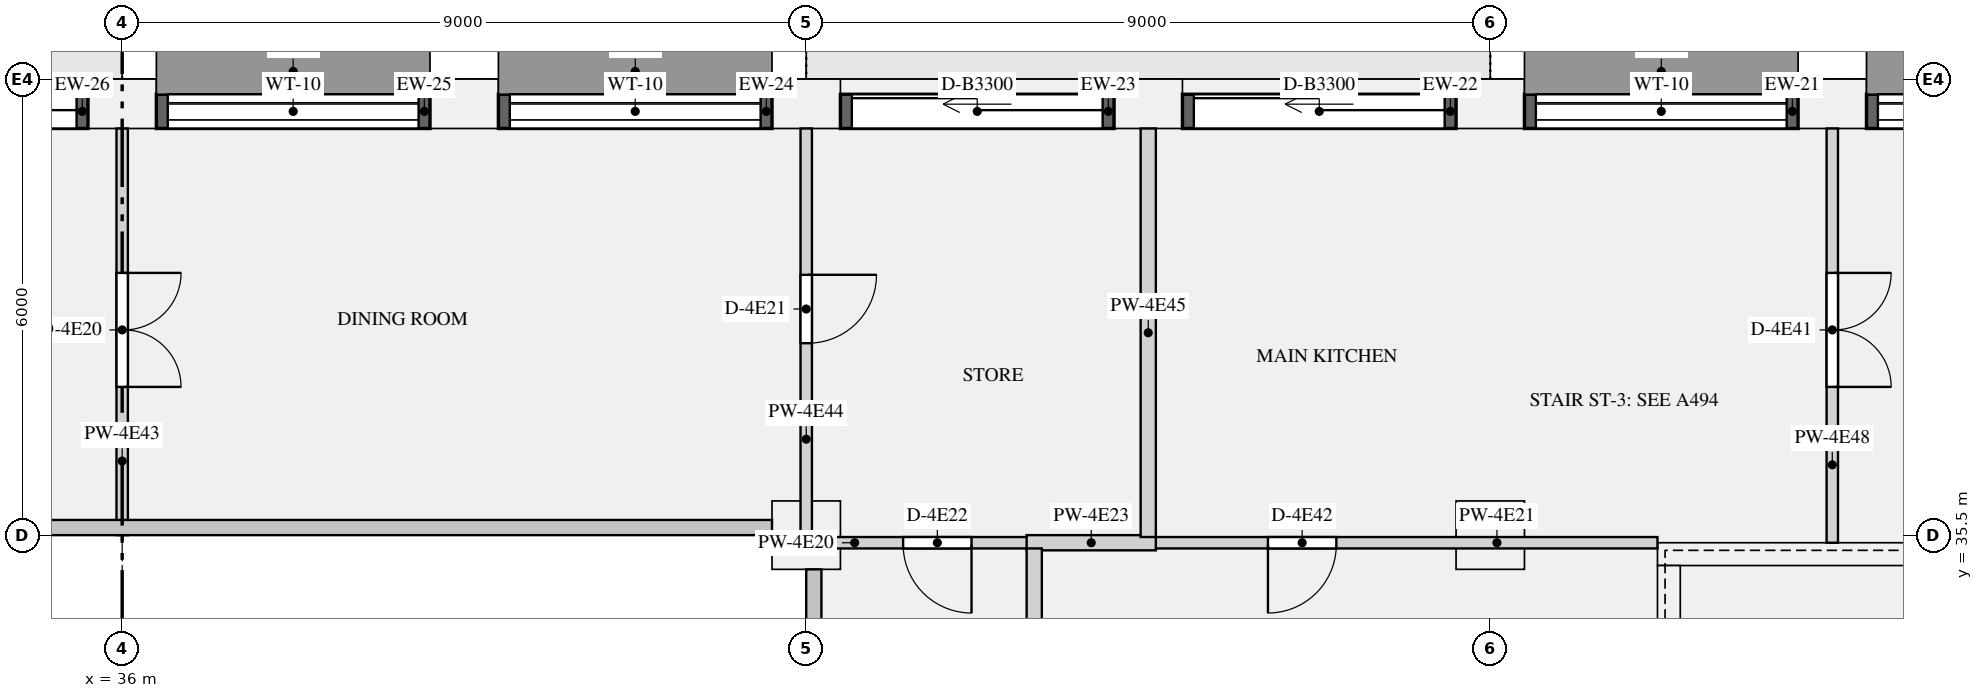
"""IFC4 building model, lengths in metres.
Left out: names, types, materials, properties, quantities, classifications, styles, units other than length and angle.
Written with IfcOpenShell. Run it as: python <this file> out.ifc"""

import sys

from ifc_helpers import new_model, si_unit, direction, frame, frame_2d, origin, origin_2d, place, context, subcontext, project, spatial, rectangle, extrude, element, fill, save


model = new_model("IFC4")
c1 = context("Model", 3, precision=1e-05, world=origin(), true_north=direction((0.0, 1.0)))
c2 = subcontext(c1, "Body", "Model", "MODEL_VIEW")
j1 = project(units=[si_unit("LENGTHUNIT", "METRE"), si_unit("PLANEANGLEUNIT", "RADIAN")], contexts=[c1])
p1 = place(None, origin())
s1 = spatial("IfcSite", under=j1, at=p1, CompositionType="ELEMENT")
p2 = place(p1, origin())
s2 = spatial("IfcBuilding", under=s1, at=p2, CompositionType="ELEMENT")
p3 = place(p2, frame((0.0, 0.0, 229.5)))
s3 = spatial("IfcBuildingStorey", under=s2, at=p3, CompositionType="ELEMENT", Elevation=229.5)
for number, where, z_axis, x_axis in (
    (1, (58.5, 41.175, 0.0), (0.0, 0.0, 1.0), (-1.0, 0.0, 0.0)),
    (2, (54.0, 41.175, 0.0), (0.0, 0.0, 1.0), (-1.0, 0.0, 0.0)),
    (3, (49.5, 41.175, 0.0), (0.0, 0.0, 1.0), (-1.0, 0.0, 0.0)),
    (4, (45.0, 41.175, 0.0), (0.0, 0.0, 1.0), (-1.0, 0.0, 0.0)),
    (5, (40.5, 41.175, 0.0), (0.0, 0.0, 1.0), (-1.0, 0.0, 0.0)),
    (6, (36.0, 41.175, 0.0), (0.0, 0.0, 1.0), (-1.0, 0.0, 0.0)),
):
    element("IfcColumn", number, at=place(p3, frame(where, z_axis=z_axis, x_axis=x_axis)), inside=s3, PredefinedType="USERDEFINED", context=c2, shape_type="SweptSolid", body=[
        extrude(rectangle(XDim=0.9, YDim=0.65, at=origin_2d()), origin(), (0.0, 0.0, 1.0), 3.15),
    ])
for number, where, z_axis, x_axis in (
    (7, (45.0, 35.5, 0.0), (0.0, 0.0, 1.0), (1.0, 0.0, 0.0)),
    (8, (54.0, 35.5, 0.0), (0.0, 0.0, 1.0), (1.0, 0.0, 0.0)),
):
    element("IfcColumn", number, at=place(p3, frame(where, z_axis=z_axis, x_axis=x_axis)), inside=s3, PredefinedType="COLUMN", context=c2, shape_type="SweptSolid", body=[
        extrude(rectangle(XDim=0.9, YDim=0.9, at=origin_2d()), origin(), (0.0, 0.0, 1.0), 3.15),
    ])
p4 = place(p3, frame((56.2, 35.25, 0.0), z_axis=(0.0, 0.0, 1.0), x_axis=(1.0, 0.0, 0.0)))
e9 = element("IfcWall", 9, at=p4, inside=s3, PredefinedType="SHEAR", context=c2, shape_type="SweptSolid", body=[
    extrude(rectangle(XDim=3.6, YDim=0.3, at=frame_2d((1.8, 0.0))), origin(), (0.0, 0.0, 1.0), 3.15),
])
p5 = place(p3, frame((56.35, 27.3, 0.0), z_axis=(0.0, 0.0, 1.0), x_axis=(0.0, 1.0, 0.0)))
e10 = element("IfcWall", 10, at=p5, inside=s3, PredefinedType="SHEAR", context=c2, shape_type="SweptSolid", body=[
    extrude(rectangle(XDim=7.8, YDim=0.3, at=frame_2d((3.9, 0.0))), origin(), (0.0, 0.0, 1.0), 3.15),
])
p6 = place(p3, frame((62.55, 41.075, 0.9), z_axis=(0.0, 0.0, 1.0), x_axis=(-1.0, 0.0, 0.0)))
e11 = element("IfcWall", 11, at=p6, inside=s3, PredefinedType="SOLIDWALL", context=c2, shape_type="SweptSolid", body=[
    extrude(rectangle(XDim=3.6, YDim=0.45, at=frame_2d((1.8, 0.0))), origin(), (0.0, 0.0, 1.0), 1.93),
])
p7 = place(p6, frame((0.15, 0.0, 0.15)))
e12 = element("IfcOpeningElement", 12, at=p7, cuts=e11, PredefinedType="OPENING", context=c2, shape_type="SweptSolid", body=[
    extrude(rectangle(XDim=3.3, YDim=1.5, at=frame_2d((1.65, 0.75))), frame((0.0, 0.235, 0.0), z_axis=(0.0, -1.0, 0.0), x_axis=(1.0, 0.0, 0.0)), (0.0, 0.0, 1.0), 0.47),
])
p8 = place(p3, frame((58.05, 41.075, 0.9), z_axis=(0.0, 0.0, 1.0), x_axis=(-1.0, 0.0, 0.0)))
e13 = element("IfcWall", 13, at=p8, inside=s3, PredefinedType="SOLIDWALL", context=c2, shape_type="SweptSolid", body=[
    extrude(rectangle(XDim=3.6, YDim=0.45, at=frame_2d((1.8, 0.0))), origin(), (0.0, 0.0, 1.0), 1.93),
])
p9 = place(p8, frame((0.15, 0.0, 0.15)))
e14 = element("IfcOpeningElement", 14, at=p9, cuts=e13, PredefinedType="OPENING", context=c2, shape_type="SweptSolid", body=[
    extrude(rectangle(XDim=3.3, YDim=1.5, at=frame_2d((1.65, 0.75))), frame((0.0, 0.235, 0.0), z_axis=(0.0, -1.0, 0.0), x_axis=(1.0, 0.0, 0.0)), (0.0, 0.0, 1.0), 0.47),
])
p10 = place(p3, frame((53.55, 41.075, 0.0), z_axis=(0.0, 0.0, 1.0), x_axis=(-1.0, 0.0, 0.0)))
e15 = element("IfcWall", 15, at=p10, inside=s3, PredefinedType="SOLIDWALL", context=c2, shape_type="SweptSolid", body=[
    extrude(rectangle(XDim=3.6, YDim=0.45, at=frame_2d((1.8, 0.0))), origin(), (0.0, 0.0, 1.0), 2.83),
])
p11 = place(p10, frame((0.15, 0.0, 0.0)))
e16 = element("IfcOpeningElement", 16, at=p11, cuts=e15, PredefinedType="OPENING", context=c2, shape_type="SweptSolid", body=[
    extrude(rectangle(XDim=3.3, YDim=2.3, at=frame_2d((1.65, 1.15))), frame((0.0, 0.235, 0.0), z_axis=(0.0, -1.0, 0.0), x_axis=(1.0, 0.0, 0.0)), (0.0, 0.0, 1.0), 0.47),
])
p12 = place(p3, frame((49.05, 41.075, 0.0), z_axis=(0.0, 0.0, 1.0), x_axis=(-1.0, 0.0, 0.0)))
e17 = element("IfcWall", 17, at=p12, inside=s3, PredefinedType="SOLIDWALL", context=c2, shape_type="SweptSolid", body=[
    extrude(rectangle(XDim=3.6, YDim=0.45, at=frame_2d((1.8, 0.0))), origin(), (0.0, 0.0, 1.0), 2.83),
])
p13 = place(p12, frame((0.15, 0.0, 0.0)))
e18 = element("IfcOpeningElement", 18, at=p13, cuts=e17, PredefinedType="OPENING", context=c2, shape_type="SweptSolid", body=[
    extrude(rectangle(XDim=3.3, YDim=2.3, at=frame_2d((1.65, 1.15))), frame((0.0, 0.235, 0.0), z_axis=(0.0, -1.0, 0.0), x_axis=(1.0, 0.0, 0.0)), (0.0, 0.0, 1.0), 0.47),
])
p14 = place(p3, frame((44.55, 41.075, 0.9), z_axis=(0.0, 0.0, 1.0), x_axis=(-1.0, 0.0, 0.0)))
e19 = element("IfcWall", 19, at=p14, inside=s3, PredefinedType="SOLIDWALL", context=c2, shape_type="SweptSolid", body=[
    extrude(rectangle(XDim=3.6, YDim=0.45, at=frame_2d((1.8, 0.0))), origin(), (0.0, 0.0, 1.0), 1.93),
])
p15 = place(p14, frame((0.15, 0.0, 0.15)))
e20 = element("IfcOpeningElement", 20, at=p15, cuts=e19, PredefinedType="OPENING", context=c2, shape_type="SweptSolid", body=[
    extrude(rectangle(XDim=3.3, YDim=1.5, at=frame_2d((1.65, 0.75))), frame((0.0, 0.235, 0.0), z_axis=(0.0, -1.0, 0.0), x_axis=(1.0, 0.0, 0.0)), (0.0, 0.0, 1.0), 0.47),
])
p16 = place(p3, frame((40.05, 41.075, 0.9), z_axis=(0.0, 0.0, 1.0), x_axis=(-1.0, 0.0, 0.0)))
e21 = element("IfcWall", 21, at=p16, inside=s3, PredefinedType="SOLIDWALL", context=c2, shape_type="SweptSolid", body=[
    extrude(rectangle(XDim=3.6, YDim=0.45, at=frame_2d((1.8, 0.0))), origin(), (0.0, 0.0, 1.0), 1.93),
])
p17 = place(p16, frame((0.15, 0.0, 0.15)))
e22 = element("IfcOpeningElement", 22, at=p17, cuts=e21, PredefinedType="OPENING", context=c2, shape_type="SweptSolid", body=[
    extrude(rectangle(XDim=3.3, YDim=1.5, at=frame_2d((1.65, 0.75))), frame((0.0, 0.235, 0.0), z_axis=(0.0, -1.0, 0.0), x_axis=(1.0, 0.0, 0.0)), (0.0, 0.0, 1.0), 0.47),
])
p18 = place(p3, frame((35.55, 41.075, 0.0), z_axis=(0.0, 0.0, 1.0), x_axis=(-1.0, 0.0, 0.0)))
e23 = element("IfcWall", 23, at=p18, inside=s3, PredefinedType="SOLIDWALL", context=c2, shape_type="SweptSolid", body=[
    extrude(rectangle(XDim=3.6, YDim=0.45, at=frame_2d((1.8, 0.0))), origin(), (0.0, 0.0, 1.0), 2.83),
])
p19 = place(p18, frame((0.15, 0.0, 0.0)))
e24 = element("IfcOpeningElement", 24, at=p19, cuts=e23, PredefinedType="OPENING", context=c2, shape_type="SweptSolid", body=[
    extrude(rectangle(XDim=3.3, YDim=2.3, at=frame_2d((1.65, 1.15))), frame((0.0, 0.235, 0.0), z_axis=(0.0, -1.0, 0.0), x_axis=(1.0, 0.0, 0.0)), (0.0, 0.0, 1.0), 0.47),
])
p20 = place(p3, frame((45.0, 35.4, 0.0), z_axis=(0.0, 0.0, 1.0), x_axis=(1.0, 0.0, 0.0)))
e25 = element("IfcWall", 25, at=p20, inside=s3, PredefinedType="PARTITIONING", context=c2, shape_type="SweptSolid", body=[
    extrude(rectangle(XDim=3.1, YDim=0.15, at=frame_2d((1.55, 0.0))), origin(), (0.0, 0.0, 1.0), 2.83),
])
p21 = place(p20, frame((1.275, 0.0, 0.0)))
e26 = element("IfcOpeningElement", 26, at=p21, cuts=e25, PredefinedType="OPENING", context=c2, shape_type="SweptSolid", body=[
    extrude(rectangle(XDim=0.9, YDim=2.1, at=frame_2d((0.45, 1.05))), frame((0.0, 0.085, 0.0), z_axis=(0.0, -1.0, 0.0), x_axis=(1.0, 0.0, 0.0)), (0.0, 0.0, 1.0), 0.17),
])
p22 = place(p3, frame((49.4, 35.4, 0.0), z_axis=(0.0, 0.0, 1.0), x_axis=(1.0, 0.0, 0.0)))
e27 = element("IfcWall", 27, at=p22, inside=s3, PredefinedType="PARTITIONING", context=c2, shape_type="SweptSolid", body=[
    extrude(rectangle(XDim=6.8, YDim=0.15, at=frame_2d((3.4, 0.0))), origin(), (0.0, 0.0, 1.0), 2.83),
])
p23 = place(p22, frame((1.675, 0.0, 0.0)))
e28 = element("IfcOpeningElement", 28, at=p23, cuts=e27, PredefinedType="OPENING", context=c2, shape_type="SweptSolid", body=[
    extrude(rectangle(XDim=0.9, YDim=2.1, at=frame_2d((0.45, 1.05))), frame((0.0, 0.085, 0.0), z_axis=(0.0, -1.0, 0.0), x_axis=(1.0, 0.0, 0.0)), (0.0, 0.0, 1.0), 0.17),
])
p24 = place(p3, frame((47.9, 35.4, 0.0), z_axis=(0.0, 0.0, 1.0), x_axis=(1.0, 0.0, 0.0)))
e29 = element("IfcWall", 29, at=p24, inside=s3, PredefinedType="PARTITIONING", context=c2, shape_type="SweptSolid", body=[
    extrude(rectangle(XDim=1.7, YDim=0.2, at=frame_2d((0.85, 0.0))), origin(), (0.0, 0.0, 1.0), 2.83),
])
p25 = place(p3, frame((48.0, 24.1, 0.0), z_axis=(0.0, 0.0, 1.0), x_axis=(0.0, 1.0, 0.0)))
e30 = element("IfcWall", 30, at=p25, inside=s3, PredefinedType="PARTITIONING", context=c2, shape_type="SweptSolid", body=[
    extrude(rectangle(XDim=11.225, YDim=0.2, at=frame_2d((5.612, 0.0))), origin(), (0.0, 0.0, 1.0), 2.83),
])
p26 = place(p3, frame((36.0, 35.5, 0.0), z_axis=(0.0, 0.0, 1.0), x_axis=(0.0, 1.0, 0.0)))
e31 = element("IfcWall", 31, at=p26, inside=s3, PredefinedType="PARTITIONING", context=c2, shape_type="SweptSolid", body=[
    extrude(rectangle(XDim=5.35, YDim=0.15, at=frame_2d((2.675, 0.0))), origin(), (0.0, 0.0, 1.0), 2.83),
])
p27 = place(p26, frame((1.95, 0.0, 0.0)))
e32 = element("IfcOpeningElement", 32, at=p27, cuts=e31, PredefinedType="OPENING", context=c2, shape_type="SweptSolid", body=[
    extrude(rectangle(XDim=1.5, YDim=2.1, at=frame_2d((0.75, 1.05))), frame((0.0, 0.085, 0.0), z_axis=(0.0, -1.0, 0.0), x_axis=(1.0, 0.0, 0.0)), (0.0, 0.0, 1.0), 0.17),
])
p28 = place(p3, frame((45.0, 35.5, 0.0), z_axis=(0.0, 0.0, 1.0), x_axis=(0.0, 1.0, 0.0)))
e33 = element("IfcWall", 33, at=p28, inside=s3, PredefinedType="PARTITIONING", context=c2, shape_type="SweptSolid", body=[
    extrude(rectangle(XDim=5.35, YDim=0.15, at=frame_2d((2.675, 0.0))), origin(), (0.0, 0.0, 1.0), 2.83),
])
p29 = place(p28, frame((2.525, 0.0, 0.0)))
e34 = element("IfcOpeningElement", 34, at=p29, cuts=e33, PredefinedType="OPENING", context=c2, shape_type="SweptSolid", body=[
    extrude(rectangle(XDim=0.9, YDim=2.1, at=frame_2d((0.45, 1.05))), frame((0.0, 0.085, 0.0), z_axis=(0.0, -1.0, 0.0), x_axis=(1.0, 0.0, 0.0)), (0.0, 0.0, 1.0), 0.17),
])
p30 = place(p3, frame((49.5, 35.475, 0.0), z_axis=(0.0, 0.0, 1.0), x_axis=(0.0, 1.0, 0.0)))
e35 = element("IfcWall", 35, at=p30, inside=s3, PredefinedType="PARTITIONING", context=c2, shape_type="SweptSolid", body=[
    extrude(rectangle(XDim=5.375, YDim=0.2, at=frame_2d((2.688, 0.0))), origin(), (0.0, 0.0, 1.0), 2.83),
])
p31 = place(p3, frame((58.5, 35.4, 0.0), z_axis=(0.0, 0.0, 1.0), x_axis=(0.0, 1.0, 0.0)))
e36 = element("IfcWall", 36, at=p31, inside=s3, PredefinedType="PARTITIONING", context=c2, shape_type="SweptSolid", body=[
    extrude(rectangle(XDim=5.45, YDim=0.15, at=frame_2d((2.725, 0.0))), origin(), (0.0, 0.0, 1.0), 2.83),
])
p32 = place(p31, frame((2.05, 0.0, 0.0)))
e37 = element("IfcOpeningElement", 37, at=p32, cuts=e36, PredefinedType="OPENING", context=c2, shape_type="SweptSolid", body=[
    extrude(rectangle(XDim=1.5, YDim=2.1, at=frame_2d((0.75, 1.05))), frame((0.0, 0.085, 0.0), z_axis=(0.0, -1.0, 0.0), x_axis=(1.0, 0.0, 0.0)), (0.0, 0.0, 1.0), 0.17),
])
p33 = place(p7, origin())
e38 = element("IfcWindow", 38, at=p33, inside=s3, PartitioningType="SINGLE_PANEL", PredefinedType="WINDOW", context=c2, shape_type="SweptSolid", body=[
    extrude(rectangle(XDim=3.3, YDim=1.5, at=frame_2d((1.65, 0.75))), frame((0.0, -0.065, 0.0), z_axis=(0.0, -1.0, 0.0), x_axis=(1.0, 0.0, 0.0)), (0.0, 0.0, 1.0), 0.06),
])
fill(e12, e38)
p34 = place(p9, origin())
e39 = element("IfcWindow", 39, at=p34, inside=s3, PartitioningType="SINGLE_PANEL", PredefinedType="WINDOW", context=c2, shape_type="SweptSolid", body=[
    extrude(rectangle(XDim=3.3, YDim=1.5, at=frame_2d((1.65, 0.75))), frame((0.0, -0.065, 0.0), z_axis=(0.0, -1.0, 0.0), x_axis=(1.0, 0.0, 0.0)), (0.0, 0.0, 1.0), 0.06),
])
fill(e14, e39)
p35 = place(p11, origin())
e40 = element("IfcDoor", 40, at=p35, inside=s3, OperationType="SLIDING_TO_LEFT", PredefinedType="DOOR", context=c2, shape_type="SweptSolid", body=[
    extrude(rectangle(XDim=3.3, YDim=2.3, at=frame_2d((1.65, 1.15))), frame((0.0, -0.07, 0.0), z_axis=(0.0, -1.0, 0.0), x_axis=(1.0, 0.0, 0.0)), (0.0, 0.0, 1.0), 0.05),
])
fill(e16, e40)
p36 = place(p13, origin())
e41 = element("IfcDoor", 41, at=p36, inside=s3, OperationType="SLIDING_TO_LEFT", PredefinedType="DOOR", context=c2, shape_type="SweptSolid", body=[
    extrude(rectangle(XDim=3.3, YDim=2.3, at=frame_2d((1.65, 1.15))), frame((0.0, -0.07, 0.0), z_axis=(0.0, -1.0, 0.0), x_axis=(1.0, 0.0, 0.0)), (0.0, 0.0, 1.0), 0.05),
])
fill(e18, e41)
p37 = place(p15, origin())
e42 = element("IfcWindow", 42, at=p37, inside=s3, PartitioningType="SINGLE_PANEL", PredefinedType="WINDOW", context=c2, shape_type="SweptSolid", body=[
    extrude(rectangle(XDim=3.3, YDim=1.5, at=frame_2d((1.65, 0.75))), frame((0.0, -0.065, 0.0), z_axis=(0.0, -1.0, 0.0), x_axis=(1.0, 0.0, 0.0)), (0.0, 0.0, 1.0), 0.06),
])
fill(e20, e42)
p38 = place(p17, origin())
e43 = element("IfcWindow", 43, at=p38, inside=s3, PartitioningType="SINGLE_PANEL", PredefinedType="WINDOW", context=c2, shape_type="SweptSolid", body=[
    extrude(rectangle(XDim=3.3, YDim=1.5, at=frame_2d((1.65, 0.75))), frame((0.0, -0.065, 0.0), z_axis=(0.0, -1.0, 0.0), x_axis=(1.0, 0.0, 0.0)), (0.0, 0.0, 1.0), 0.06),
])
fill(e22, e43)
p39 = place(p19, origin())
e44 = element("IfcDoor", 44, at=p39, inside=s3, OperationType="SLIDING_TO_LEFT", PredefinedType="DOOR", context=c2, shape_type="SweptSolid", body=[
    extrude(rectangle(XDim=3.3, YDim=2.3, at=frame_2d((1.65, 1.15))), frame((0.0, -0.07, 0.0), z_axis=(0.0, -1.0, 0.0), x_axis=(1.0, 0.0, 0.0)), (0.0, 0.0, 1.0), 0.05),
])
fill(e24, e44)
p40 = place(p27, frame((1.5, 0.0, 0.0), z_axis=(0.0, 0.0, 1.0), x_axis=(-1.0, 0.0, 0.0)))
e45 = element("IfcDoor", 45, at=p40, inside=s3, OperationType="DOUBLE_DOOR_SINGLE_SWING", PredefinedType="DOOR", context=c2, shape_type="SweptSolid", body=[
    extrude(rectangle(XDim=1.5, YDim=2.1, at=frame_2d((0.75, 1.05))), frame((0.0, 0.025, 0.0), z_axis=(0.0, -1.0, 0.0), x_axis=(1.0, 0.0, 0.0)), (0.0, 0.0, 1.0), 0.05),
])
fill(e32, e45)
p41 = place(p29, frame((0.9, 0.0, 0.0), z_axis=(0.0, 0.0, 1.0), x_axis=(-1.0, 0.0, 0.0)))
e46 = element("IfcDoor", 46, at=p41, inside=s3, OperationType="SINGLE_SWING_LEFT", PredefinedType="DOOR", context=c2, shape_type="SweptSolid", body=[
    extrude(rectangle(XDim=0.9, YDim=2.1, at=frame_2d((0.45, 1.05))), frame((0.0, 0.025, 0.0), z_axis=(0.0, -1.0, 0.0), x_axis=(1.0, 0.0, 0.0)), (0.0, 0.0, 1.0), 0.05),
])
fill(e34, e46)
p42 = place(p21, frame((0.9, 0.0, 0.0), z_axis=(0.0, 0.0, 1.0), x_axis=(-1.0, 0.0, 0.0)))
e47 = element("IfcDoor", 47, at=p42, inside=s3, OperationType="SINGLE_SWING_LEFT", PredefinedType="DOOR", context=c2, shape_type="SweptSolid", body=[
    extrude(rectangle(XDim=0.9, YDim=2.1, at=frame_2d((0.45, 1.05))), frame((0.0, 0.025, 0.0), z_axis=(0.0, -1.0, 0.0), x_axis=(1.0, 0.0, 0.0)), (0.0, 0.0, 1.0), 0.05),
])
fill(e26, e47)
p43 = place(p32, frame((1.5, 0.0, 0.0), z_axis=(0.0, 0.0, 1.0), x_axis=(-1.0, 0.0, 0.0)))
e48 = element("IfcDoor", 48, at=p43, inside=s3, OperationType="DOUBLE_DOOR_SINGLE_SWING", PredefinedType="DOOR", context=c2, shape_type="SweptSolid", body=[
    extrude(rectangle(XDim=1.5, YDim=2.1, at=frame_2d((0.75, 1.05))), frame((0.0, 0.025, 0.0), z_axis=(0.0, -1.0, 0.0), x_axis=(1.0, 0.0, 0.0)), (0.0, 0.0, 1.0), 0.05),
])
fill(e37, e48)
p44 = place(p23, frame((0.9, 0.0, 0.0), z_axis=(0.0, 0.0, 1.0), x_axis=(-1.0, 0.0, 0.0)))
e49 = element("IfcDoor", 49, at=p44, inside=s3, OperationType="SINGLE_SWING_RIGHT", PredefinedType="DOOR", context=c2, shape_type="SweptSolid", body=[
    extrude(rectangle(XDim=0.9, YDim=2.1, at=frame_2d((0.45, 1.05))), frame((0.0, 0.025, 0.0), z_axis=(0.0, -1.0, 0.0), x_axis=(1.0, 0.0, 0.0)), (0.0, 0.0, 1.0), 0.05),
])
fill(e28, e49)
save(model, sys.argv[1])
